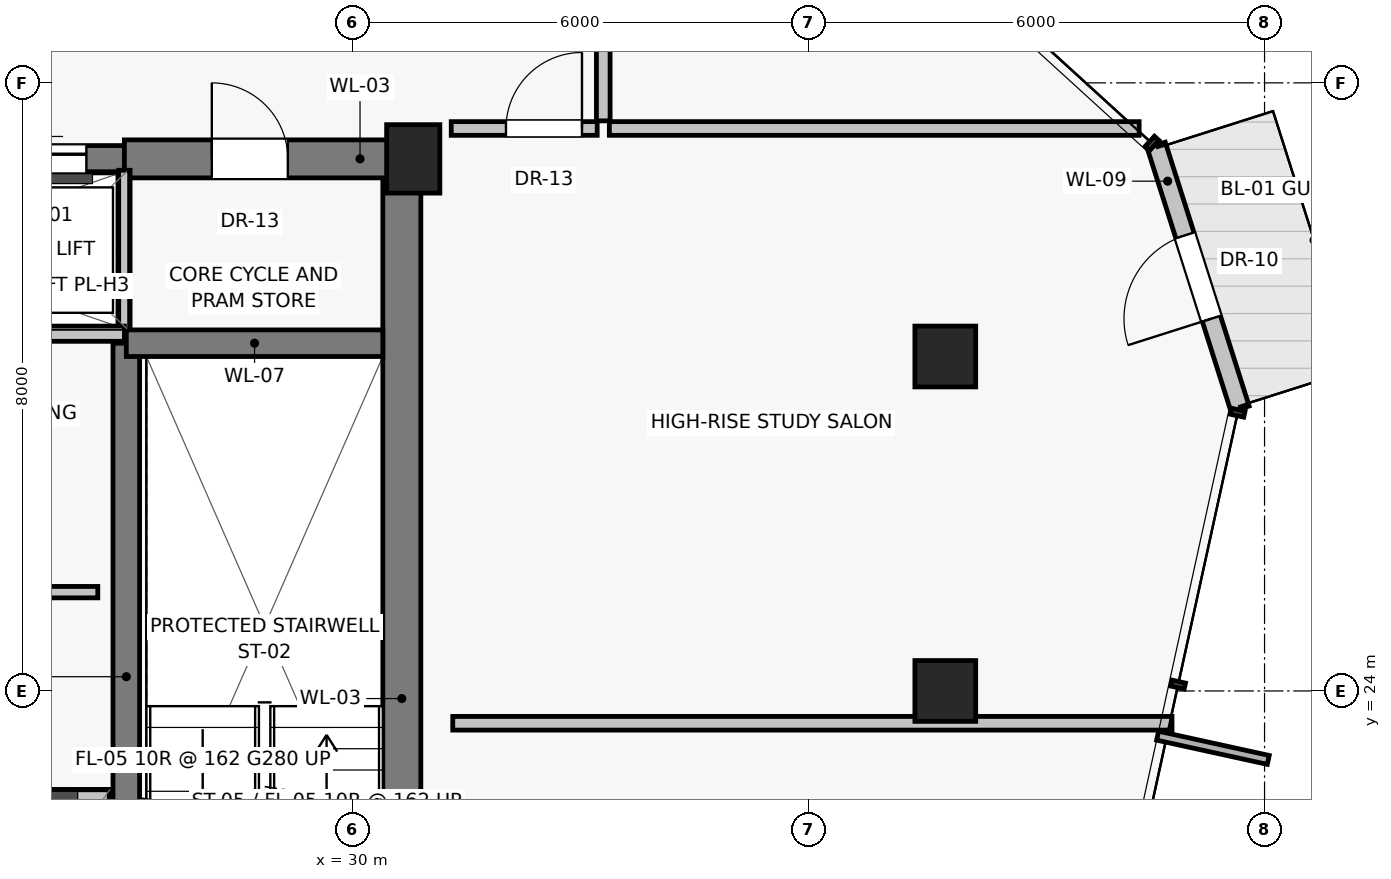
"""IFC4 building model, lengths in metres.
Left out: names, types, materials, properties, quantities, classifications, styles, units other than length and angle.
Written with IfcOpenShell. Run it as: python <this file> out.ifc"""

import sys

from ifc_helpers import new_model, si_unit, direction, frame, frame_2d, origin, origin_2d, place, context, subcontext, project, spatial, rectangle, extrude, source, transform, mapped, element, fill, save


model = new_model("IFC4")
c1 = context("Model", 3, precision=1e-05, world=origin(), true_north=direction((0.0, 1.0)))
c2 = subcontext(c1, "Body", "Model", "MODEL_VIEW")
j1 = project(units=[si_unit("LENGTHUNIT", "METRE"), si_unit("PLANEANGLEUNIT", "RADIAN")], contexts=[c1])
p1 = place(None, origin())
s1 = spatial("IfcSite", under=j1, at=p1, CompositionType="ELEMENT")
p2 = place(p1, origin())
s2 = spatial("IfcBuilding", under=s1, at=p2, CompositionType="ELEMENT")
p3 = place(p2, frame((0.0, 0.0, 251.25)))
s3 = spatial("IfcBuildingStorey", under=s2, at=p3, CompositionType="ELEMENT", Elevation=251.25)
p4 = place(p3, frame((30.8, 31.0, 0.0), z_axis=(0.0, 0.0, 1.0), x_axis=(1.0, 0.0, 0.0)))
e1 = element("IfcColumn", 1, at=p4, inside=s3, PredefinedType="PILASTER", context=c2, shape_type="SweptSolid", body=[
    extrude(rectangle(XDim=0.7, YDim=0.9, at=origin_2d()), origin(), (0.0, 0.0, 1.0), 3.25),
])
for number, where, z_axis, x_axis in (
    (2, (37.8, 24.0, 0.0), (0.0, 0.0, 1.0), (1.0, 0.0, 0.0)),
    (3, (37.8, 28.4, 0.0), (0.0, 0.0, 1.0), (1.0, 0.0, 0.0)),
):
    element("IfcColumn", number, at=place(p3, frame(where, z_axis=z_axis, x_axis=x_axis)), inside=s3, PredefinedType="COLUMN", context=c2, shape_type="SweptSolid", body=[
        extrude(rectangle(XDim=0.8, YDim=0.8, at=origin_2d()), origin(), (0.0, 0.0, 1.0), 3.25),
    ])
p5 = place(p3, frame((41.678, 27.71, 0.0), z_axis=(0.0, 0.0, 1.0), x_axis=(-0.303026591546, 0.952982100995, 0.0)))
e4 = element("IfcWall", 4, at=p5, inside=s3, PredefinedType="SOLIDWALL", context=c2, shape_type="SweptSolid", body=[
    extrude(rectangle(XDim=3.642, YDim=0.25, at=frame_2d((1.821, 0.0))), origin(), (0.0, 0.0, 1.0), 3.015),
])
p6 = place(p5, frame((1.246, 0.0, 0.0)))
e5 = element("IfcOpeningElement", 5, at=p6, cuts=e4, PredefinedType="OPENING", context=c2, shape_type="SweptSolid", body=[
    extrude(rectangle(XDim=1.15, YDim=2.25, at=frame_2d((0.575, 1.125))), frame((0.0, 0.135, 0.0), z_axis=(0.0, -1.0, 0.0), x_axis=(1.0, 0.0, 0.0)), (0.0, 0.0, 1.0), 0.27),
])
p7 = place(p3, frame((30.65, 16.8, 0.0), z_axis=(0.0, 0.0, 1.0), x_axis=(0.0, 1.0, 0.0)))
e6 = element("IfcWall", 6, at=p7, inside=s3, PredefinedType="SHEAR", context=c2, shape_type="SweptSolid", body=[
    extrude(rectangle(XDim=14.2, YDim=0.5, at=frame_2d((7.1, 0.0))), origin(), (0.0, 0.0, 1.0), 3.015),
])
p8 = place(p3, frame((21.0, 31.0, 0.0), z_axis=(0.0, 0.0, 1.0), x_axis=(1.0, 0.0, 0.0)))
e7 = element("IfcWall", 7, at=p8, inside=s3, PredefinedType="SHEAR", context=c2, shape_type="SweptSolid", body=[
    extrude(rectangle(XDim=6.0, YDim=0.35, at=frame_2d((3.0, 0.0))), origin(), (0.0, 0.0, 1.0), 3.015),
])
p9 = place(p8, frame((0.5, 0.0, 0.0)))
e8 = element("IfcOpeningElement", 8, at=p9, cuts=e7, PredefinedType="OPENING", context=c2, shape_type="SweptSolid", body=[
    extrude(rectangle(XDim=1.1, YDim=2.08, at=frame_2d((0.55, 1.04))), frame((0.0, 0.185, 0.0), z_axis=(0.0, -1.0, 0.0), x_axis=(1.0, 0.0, 0.0)), (0.0, 0.0, 1.0), 0.37),
])
p10 = place(p8, frame((2.45, 0.0, 0.0)))
e9 = element("IfcOpeningElement", 9, at=p10, cuts=e7, PredefinedType="OPENING", context=c2, shape_type="SweptSolid", body=[
    extrude(rectangle(XDim=1.1, YDim=2.08, at=frame_2d((0.55, 1.04))), frame((0.0, 0.185, 0.0), z_axis=(0.0, -1.0, 0.0), x_axis=(1.0, 0.0, 0.0)), (0.0, 0.0, 1.0), 0.37),
])
p11 = place(p8, frame((4.4, 0.0, 0.0)))
e10 = element("IfcOpeningElement", 10, at=p11, cuts=e7, PredefinedType="OPENING", context=c2, shape_type="SweptSolid", body=[
    extrude(rectangle(XDim=1.1, YDim=2.08, at=frame_2d((0.55, 1.04))), frame((0.0, 0.185, 0.0), z_axis=(0.0, -1.0, 0.0), x_axis=(1.0, 0.0, 0.0)), (0.0, 0.0, 1.0), 0.37),
])
p12 = place(p3, frame((27.0, 31.0, 0.0), z_axis=(0.0, 0.0, 1.0), x_axis=(1.0, 0.0, 0.0)))
e11 = element("IfcWall", 11, at=p12, inside=s3, PredefinedType="SHEAR", context=c2, shape_type="SweptSolid", body=[
    extrude(rectangle(XDim=3.8, YDim=0.5, at=frame_2d((1.9, 0.0))), origin(), (0.0, 0.0, 1.0), 3.015),
])
p13 = place(p12, frame((1.15, 0.0, 0.0)))
e12 = element("IfcOpeningElement", 12, at=p13, cuts=e11, PredefinedType="OPENING", context=c2, shape_type="SweptSolid", body=[
    extrude(rectangle(XDim=1.0, YDim=2.01, at=frame_2d((0.5, 1.005))), frame((0.0, 0.26, 0.0), z_axis=(0.0, -1.0, 0.0), x_axis=(1.0, 0.0, 0.0)), (0.0, 0.0, 1.0), 0.52),
])
p14 = place(p3, frame((27.0, 28.65, 0.0), z_axis=(0.0, 0.0, 1.0), x_axis=(0.0, 1.0, 0.0)))
e13 = element("IfcWall", 13, at=p14, inside=s3, PredefinedType="PARTITIONING", context=c2, shape_type="SweptSolid", body=[
    extrude(rectangle(XDim=2.2, YDim=0.15, at=frame_2d((1.1, 0.0))), origin(), (0.0, 0.0, 1.0), 3.015),
])
p15 = place(p3, frame((27.025, 19.8, 0.0), z_axis=(0.0, 0.0, 1.0), x_axis=(0.0, 1.0, 0.0)))
e14 = element("IfcWall", 14, at=p15, inside=s3, PredefinedType="SHEAR", context=c2, shape_type="SweptSolid", body=[
    extrude(rectangle(XDim=8.775, YDim=0.35, at=frame_2d((4.387, 0.0))), origin(), (0.0, 0.0, 1.0), 3.015),
])
p16 = place(p3, frame((27.025, 28.575, 0.0), z_axis=(0.0, 0.0, 1.0), x_axis=(1.0, 0.0, 0.0)))
e15 = element("IfcWall", 15, at=p16, inside=s3, PredefinedType="SHEAR", context=c2, shape_type="SweptSolid", body=[
    extrude(rectangle(XDim=3.375, YDim=0.35, at=frame_2d((1.688, 0.0))), origin(), (0.0, 0.0, 1.0), 3.015),
])
p17 = place(p3, frame((24.95, 22.6, 0.0), z_axis=(0.0, 0.0, 1.0), x_axis=(1.0, 0.0, 0.0)))
e16 = element("IfcWall", 16, at=p17, inside=s3, PredefinedType="SOLIDWALL", context=c2, shape_type="SweptSolid", body=[
    extrude(rectangle(XDim=1.85, YDim=0.2, at=frame_2d((0.925, 0.0))), origin(), (0.0, 0.0, 1.0), 3.015),
])
p18 = place(p3, frame((21.0, 28.7, 0.0), z_axis=(0.0, 0.0, 1.0), x_axis=(1.0, 0.0, 0.0)))
e17 = element("IfcWall", 17, at=p18, inside=s3, PredefinedType="SOLIDWALL", context=c2, shape_type="SweptSolid", body=[
    extrude(rectangle(XDim=6.0, YDim=0.2, at=frame_2d((3.0, 0.0))), origin(), (0.0, 0.0, 1.0), 3.015),
])
p19 = place(p3, frame((24.1, 25.3, 0.0), z_axis=(0.0, 0.0, 1.0), x_axis=(1.0, 0.0, 0.0)))
e18 = element("IfcWall", 18, at=p19, inside=s3, PredefinedType="PARTITIONING", context=c2, shape_type="SweptSolid", body=[
    extrude(rectangle(XDim=2.55, YDim=0.15, at=frame_2d((1.275, 0.0))), origin(), (0.0, 0.0, 1.0), 3.015),
])
p20 = place(p19, frame((0.8, 0.0, 0.0)))
e19 = element("IfcOpeningElement", 19, at=p20, cuts=e18, PredefinedType="OPENING", context=c2, shape_type="SweptSolid", body=[
    extrude(rectangle(XDim=0.86, YDim=2.01, at=frame_2d((0.43, 1.005))), frame((0.0, 0.085, 0.0), z_axis=(0.0, -1.0, 0.0), x_axis=(1.0, 0.0, 0.0)), (0.0, 0.0, 1.0), 0.17),
])
p21 = place(p3, frame((31.32, 23.575, 0.0), z_axis=(0.0, 0.0, 1.0), x_axis=(1.0, 0.0, 0.0)))
e20 = element("IfcWall", 20, at=p21, inside=s3, PredefinedType="PARTITIONING", context=c2, shape_type="SweptSolid", body=[
    extrude(rectangle(XDim=9.462, YDim=0.18, at=frame_2d((4.731, 0.0))), origin(), (0.0, 0.0, 1.0), 3.015),
])
p22 = place(p3, frame((33.3, 31.5, 0.0), z_axis=(0.0, 0.0, 1.0), x_axis=(0.0, 1.0, 0.0)))
e21 = element("IfcWall", 21, at=p22, inside=s3, PredefinedType="PARTITIONING", context=c2, shape_type="SweptSolid", body=[
    extrude(rectangle(XDim=1.9, YDim=0.18, at=frame_2d((0.95, 0.0))), origin(), (0.0, 0.0, 1.0), 3.015),
])
p23 = place(p3, frame((31.3, 31.4, 0.0), z_axis=(0.0, 0.0, 1.0), x_axis=(1.0, 0.0, 0.0)))
e22 = element("IfcWall", 22, at=p23, inside=s3, PredefinedType="PARTITIONING", context=c2, shape_type="SweptSolid", body=[
    extrude(rectangle(XDim=1.92, YDim=0.18, at=frame_2d((0.96, 0.0))), origin(), (0.0, 0.0, 1.0), 3.015),
])
p24 = place(p23, frame((0.72, 0.0, 0.0)))
e23 = element("IfcOpeningElement", 23, at=p24, cuts=e22, PredefinedType="OPENING", context=c2, shape_type="SweptSolid", body=[
    extrude(rectangle(XDim=1.0, YDim=2.01, at=frame_2d((0.5, 1.005))), frame((0.0, 0.1, 0.0), z_axis=(0.0, -1.0, 0.0), x_axis=(1.0, 0.0, 0.0)), (0.0, 0.0, 1.0), 0.2),
])
p25 = place(p3, frame((33.38, 31.4, 0.0), z_axis=(0.0, 0.0, 1.0), x_axis=(1.0, 0.0, 0.0)))
e24 = element("IfcWall", 24, at=p25, inside=s3, PredefinedType="PARTITIONING", context=c2, shape_type="SweptSolid", body=[
    extrude(rectangle(XDim=6.97, YDim=0.18, at=frame_2d((3.485, 0.0))), origin(), (0.0, 0.0, 1.0), 3.015),
])
m1 = source(origin(), c2, "Body", "SweptSolid", [
    extrude(rectangle(XDim=1.15, YDim=2.25, at=frame_2d((0.575, 1.125))), frame((0.0, 0.025, 0.0), z_axis=(0.0, -1.0, 0.0), x_axis=(1.0, 0.0, 0.0)), (0.0, 0.0, 1.0), 0.05),
])
p26 = place(p6, frame((1.15, 0.0, 0.0), z_axis=(0.0, 0.0, 1.0), x_axis=(-1.0, 0.0, 0.0)))
e25 = element("IfcDoor", 25, at=p26, inside=s3, OperationType="SINGLE_SWING_LEFT", PredefinedType="DOOR", context=c2, shape_type="MappedRepresentation", body=[
    mapped(m1, transform((0.0, 0.0, 0.0), scale=1.0)),
])
fill(e5, e25)
m2 = source(origin(), c2, "Body", "SweptSolid", [
    extrude(rectangle(XDim=1.1, YDim=2.08, at=frame_2d((0.55, 1.04))), frame((0.0, 0.025, 0.0), z_axis=(0.0, -1.0, 0.0), x_axis=(1.0, 0.0, 0.0)), (0.0, 0.0, 1.0), 0.05),
])
p27 = place(p11, origin())
e26 = element("IfcDoor", 26, at=p27, inside=s3, OperationType="SLIDING_TO_LEFT", PredefinedType="DOOR", context=c2, shape_type="MappedRepresentation", body=[
    mapped(m2, transform((0.0, 0.0, 0.0), scale=1.0)),
])
fill(e10, e26)
m3 = source(origin(), c2, "Body", "SweptSolid", [
    extrude(rectangle(XDim=1.0, YDim=2.01, at=frame_2d((0.5, 1.005))), frame((0.0, 0.025, 0.0), z_axis=(0.0, -1.0, 0.0), x_axis=(1.0, 0.0, 0.0)), (0.0, 0.0, 1.0), 0.05),
])
p28 = place(p13, origin())
e27 = element("IfcDoor", 27, at=p28, inside=s3, OperationType="SINGLE_SWING_LEFT", PredefinedType="DOOR", context=c2, shape_type="MappedRepresentation", body=[
    mapped(m3, transform((0.0, 0.0, 0.0), scale=1.0)),
])
fill(e12, e27)
p29 = place(p24, origin())
e28 = element("IfcDoor", 28, at=p29, inside=s3, OperationType="SINGLE_SWING_RIGHT", PredefinedType="DOOR", context=c2, shape_type="MappedRepresentation", body=[
    mapped(m3, transform((0.0, 0.0, 0.0), scale=1.0)),
])
fill(e23, e28)
save(model, sys.argv[1])
